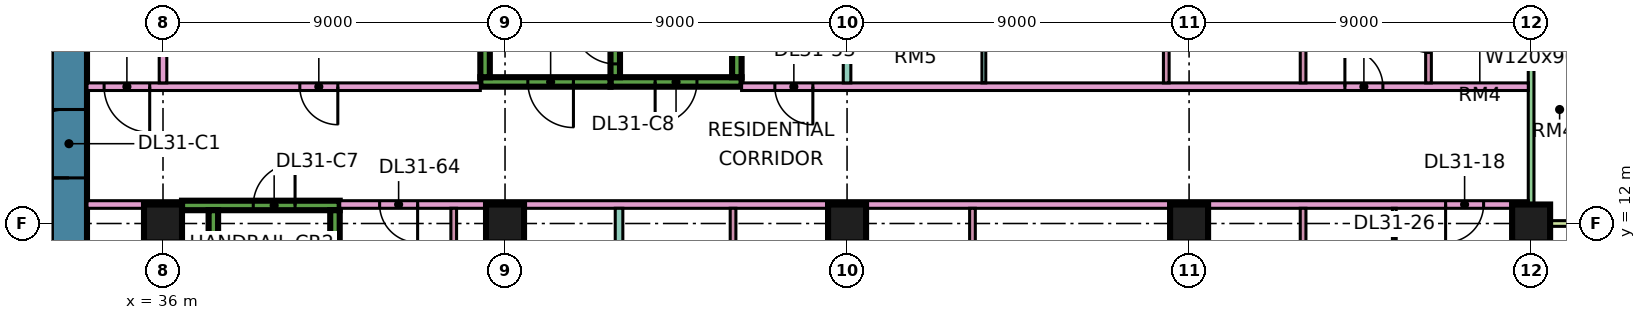
"""IFC4 building model, lengths in metres.
Left out: names, types, materials, properties, quantities, classifications, styles, units other than length and angle.
Written with IfcOpenShell. Run it as: python <this file> out.ifc"""

import sys

from ifc_helpers import new_model, si_unit, direction, frame, frame_2d, origin, origin_2d, place, context, subcontext, project, spatial, rectangle, extrude, element, fill, save


model = new_model("IFC4")
c1 = context("Model", 3, precision=1e-05, world=origin(), true_north=direction((0.0, 1.0)))
c2 = subcontext(c1, "Body", "Model", "MODEL_VIEW")
j1 = project(units=[si_unit("LENGTHUNIT", "METRE"), si_unit("PLANEANGLEUNIT", "RADIAN")], contexts=[c1])
p1 = place(None, origin())
s1 = spatial("IfcSite", under=j1, at=p1, CompositionType="ELEMENT")
p2 = place(p1, origin())
s2 = spatial("IfcBuilding", under=s1, at=p2, CompositionType="ELEMENT")
p3 = place(p2, frame((0.0, 0.0, 133.15)))
s3 = spatial("IfcBuildingStorey", under=s2, at=p3, CompositionType="ELEMENT", Elevation=133.15)
for number, where, z_axis, x_axis in (
    (1, (36.0, 12.0, 0.0), (0.0, 0.0, 1.0), (1.0, 0.0, 0.0)),
    (2, (45.0, 12.0, 0.0), (0.0, 0.0, 1.0), (1.0, 0.0, 0.0)),
    (3, (54.0, 12.0, 0.0), (0.0, 0.0, 1.0), (1.0, 0.0, 0.0)),
    (4, (63.0, 12.0, 0.0), (0.0, 0.0, 1.0), (1.0, 0.0, 0.0)),
    (5, (72.0, 12.0, 0.0), (0.0, 0.0, 1.0), (1.0, 0.0, 0.0)),
):
    element("IfcColumn", number, at=place(p3, frame(where, z_axis=z_axis, x_axis=x_axis)), inside=s3, PredefinedType="COLUMN", context=c2, shape_type="SweptSolid", body=[
        extrude(rectangle(XDim=1.0, YDim=1.0, at=origin_2d()), origin(), (0.0, 0.0, 1.0), 3.75),
    ])
p4 = place(p3, frame((33.525, 7.95, 0.0), z_axis=(0.0, 0.0, 1.0), x_axis=(0.0, 1.0, 0.0)))
e6 = element("IfcWall", 6, at=p4, inside=s3, PredefinedType="SHEAR", context=c2, shape_type="SweptSolid", body=[
    extrude(rectangle(XDim=11.1, YDim=0.95, at=frame_2d((5.55, 0.0))), origin(), (0.0, 0.0, 1.0), 3.75),
])
p5 = place(p4, frame((5.25, 0.0, 0.0)))
e7 = element("IfcOpeningElement", 7, at=p5, cuts=e6, PredefinedType="OPENING", context=c2, shape_type="SweptSolid", body=[
    extrude(rectangle(XDim=1.8, YDim=2.4, at=frame_2d((0.9, 1.2))), frame((0.0, 0.485, 0.0), z_axis=(0.0, -1.0, 0.0), x_axis=(1.0, 0.0, 0.0)), (0.0, 0.0, 1.0), 0.97),
])
p6 = place(p3, frame((36.5, 12.475, 0.0), z_axis=(0.0, 0.0, 1.0), x_axis=(1.0, 0.0, 0.0)))
e8 = element("IfcWall", 8, at=p6, inside=s3, PredefinedType="SHEAR", context=c2, shape_type="SweptSolid", body=[
    extrude(rectangle(XDim=4.15, YDim=0.25, at=frame_2d((2.075, 0.0))), origin(), (0.0, 0.0, 1.0), 3.75),
])
p7 = place(p6, frame((1.875, 0.0, 0.0)))
e9 = element("IfcOpeningElement", 9, at=p7, cuts=e8, PredefinedType="OPENING", context=c2, shape_type="SweptSolid", body=[
    extrude(rectangle(XDim=1.1, YDim=2.2, at=frame_2d((0.55, 1.1))), frame((0.0, 0.135, 0.0), z_axis=(0.0, -1.0, 0.0), x_axis=(1.0, 0.0, 0.0)), (0.0, 0.0, 1.0), 0.27),
])
for number, where, z_axis, x_axis in (
    (10, (37.325, 5.85, 0.0), (0.0, 0.0, 1.0), (0.0, 1.0, 0.0)),
    (11, (40.525, 5.85, 0.0), (0.0, 0.0, 1.0), (0.0, 1.0, 0.0)),
):
    element("IfcWall", number, at=place(p3, frame(where, z_axis=z_axis, x_axis=x_axis)), inside=s3, PredefinedType="SHEAR", context=c2, shape_type="SweptSolid", body=[
        extrude(rectangle(XDim=6.5, YDim=0.25, at=frame_2d((3.25, 0.0))), origin(), (0.0, 0.0, 1.0), 3.75),
    ])
p8 = place(p3, frame((47.775, 15.725, 0.0), z_axis=(0.0, 0.0, 1.0), x_axis=(1.0, 0.0, 0.0)))
e12 = element("IfcWall", 12, at=p8, inside=s3, PredefinedType="SHEAR", context=c2, shape_type="SweptSolid", body=[
    extrude(rectangle(XDim=3.45, YDim=0.25, at=frame_2d((1.725, 0.0))), origin(), (0.0, 0.0, 1.0), 3.75),
])
p9 = place(p8, frame((1.175, 0.0, 0.0)))
e13 = element("IfcOpeningElement", 13, at=p9, cuts=e12, PredefinedType="OPENING", context=c2, shape_type="SweptSolid", body=[
    extrude(rectangle(XDim=1.1, YDim=2.2, at=frame_2d((0.55, 1.1))), frame((0.0, 0.135, 0.0), z_axis=(0.0, -1.0, 0.0), x_axis=(1.0, 0.0, 0.0)), (0.0, 0.0, 1.0), 0.27),
])
p10 = place(p3, frame((47.9, 15.85, 0.0), z_axis=(0.0, 0.0, 1.0), x_axis=(0.0, 1.0, 0.0)))
e14 = element("IfcWall", 14, at=p10, inside=s3, PredefinedType="SHEAR", context=c2, shape_type="SweptSolid", body=[
    extrude(rectangle(XDim=6.5, YDim=0.25, at=frame_2d((3.25, 0.0))), origin(), (0.0, 0.0, 1.0), 3.75),
])
p11 = place(p10, frame((0.35, 0.0, 0.0)))
e15 = element("IfcOpeningElement", 15, at=p11, cuts=e14, PredefinedType="OPENING", context=c2, shape_type="SweptSolid", body=[
    extrude(rectangle(XDim=1.1, YDim=2.2, at=frame_2d((0.55, 1.1))), frame((0.0, 0.135, 0.0), z_axis=(0.0, -1.0, 0.0), x_axis=(1.0, 0.0, 0.0)), (0.0, 0.0, 1.0), 0.27),
])
p12 = place(p3, frame((51.1, 15.85, 0.0), z_axis=(0.0, 0.0, 1.0), x_axis=(0.0, 1.0, 0.0)))
e16 = element("IfcWall", 16, at=p12, inside=s3, PredefinedType="SHEAR", context=c2, shape_type="SweptSolid", body=[
    extrude(rectangle(XDim=6.5, YDim=0.25, at=frame_2d((3.25, 0.0))), origin(), (0.0, 0.0, 1.0), 3.75),
])
p13 = place(p3, frame((44.35, 15.725, 0.0), z_axis=(0.0, 0.0, 1.0), x_axis=(1.0, 0.0, 0.0)))
e17 = element("IfcWall", 17, at=p13, inside=s3, PredefinedType="SHEAR", context=c2, shape_type="SweptSolid", body=[
    extrude(rectangle(XDim=3.425, YDim=0.25, at=frame_2d((1.712, 0.0))), origin(), (0.0, 0.0, 1.0), 3.75),
])
p14 = place(p13, frame((1.25, 0.0, 0.0)))
e18 = element("IfcOpeningElement", 18, at=p14, cuts=e17, PredefinedType="OPENING", context=c2, shape_type="SweptSolid", body=[
    extrude(rectangle(XDim=1.2, YDim=2.2, at=frame_2d((0.6, 1.1))), frame((0.0, 0.135, 0.0), z_axis=(0.0, -1.0, 0.0), x_axis=(1.0, 0.0, 0.0)), (0.0, 0.0, 1.0), 0.27),
])
p15 = place(p3, frame((44.475, 15.85, 0.0), z_axis=(0.0, 0.0, 1.0), x_axis=(0.0, 1.0, 0.0)))
e19 = element("IfcWall", 19, at=p15, inside=s3, PredefinedType="SHEAR", context=c2, shape_type="SweptSolid", body=[
    extrude(rectangle(XDim=6.5, YDim=0.25, at=frame_2d((3.25, 0.0))), origin(), (0.0, 0.0, 1.0), 3.75),
])
p16 = place(p15, frame((1.75, 0.0, 0.0)))
e20 = element("IfcOpeningElement", 20, at=p16, cuts=e19, PredefinedType="OPENING", context=c2, shape_type="SweptSolid", body=[
    extrude(rectangle(XDim=1.1, YDim=2.2, at=frame_2d((0.55, 1.1))), frame((0.0, 0.135, 0.0), z_axis=(0.0, -1.0, 0.0), x_axis=(1.0, 0.0, 0.0)), (0.0, 0.0, 1.0), 0.27),
])
p17 = place(p15, frame((4.3, 0.0, 0.0)))
e21 = element("IfcOpeningElement", 21, at=p17, cuts=e19, PredefinedType="OPENING", context=c2, shape_type="SweptSolid", body=[
    extrude(rectangle(XDim=1.1, YDim=2.2, at=frame_2d((0.55, 1.1))), frame((0.0, 0.135, 0.0), z_axis=(0.0, -1.0, 0.0), x_axis=(1.0, 0.0, 0.0)), (0.0, 0.0, 1.0), 0.27),
])
p18 = place(p3, frame((72.0, 12.075, 0.0), z_axis=(0.0, 0.0, 1.0), x_axis=(0.0, 1.0, 0.0)))
e22 = element("IfcWall", 22, at=p18, inside=s3, PredefinedType="SOLIDWALL", context=c2, shape_type="SweptSolid", body=[
    extrude(rectangle(XDim=10.35, YDim=0.15, at=frame_2d((5.175, 0.0))), origin(), (0.0, 0.0, 1.0), 3.35),
])
p19 = place(p18, frame((4.275, 0.0, 1.7)))
e23 = element("IfcOpeningElement", 23, at=p19, cuts=e22, PredefinedType="OPENING", context=c2, shape_type="SweptSolid", body=[
    extrude(rectangle(XDim=1.2, YDim=0.9, at=frame_2d((0.6, 0.45))), frame((0.0, 0.085, 0.0), z_axis=(0.0, -1.0, 0.0), x_axis=(1.0, 0.0, 0.0)), (0.0, 0.0, 1.0), 0.17),
])
p20 = place(p18, frame((7.988, 0.0, 0.45)))
e24 = element("IfcOpeningElement", 24, at=p20, cuts=e22, PredefinedType="OPENING", context=c2, shape_type="SweptSolid", body=[
    extrude(rectangle(XDim=1.8, YDim=2.4, at=frame_2d((0.9, 1.2))), frame((0.0, 0.085, 0.0), z_axis=(0.0, -1.0, 0.0), x_axis=(1.0, 0.0, 0.0)), (0.0, 0.0, 1.0), 0.17),
])
p21 = place(p3, frame((73.5, 12.0, 0.0), z_axis=(0.0, 0.0, 1.0), x_axis=(-1.0, 0.0, 0.0)))
e25 = element("IfcWall", 25, at=p21, inside=s3, PredefinedType="SOLIDWALL", context=c2, shape_type="SweptSolid", body=[
    extrude(rectangle(XDim=1.5, YDim=0.15, at=frame_2d((0.75, 0.0))), origin(), (0.0, 0.0, 1.0), 3.35),
])
p22 = place(p3, frame((34.0, 12.5, 0.0), z_axis=(0.0, 0.0, 1.0), x_axis=(1.0, 0.0, 0.0)))
e26 = element("IfcWall", 26, at=p22, inside=s3, PredefinedType="PARTITIONING", context=c2, shape_type="SweptSolid", body=[
    extrude(rectangle(XDim=2.501, YDim=0.2, at=frame_2d((1.25, 0.0))), origin(), (0.0, 0.0, 1.0), 3.35),
])
p23 = place(p3, frame((34.0, 15.6, 0.0), z_axis=(0.0, 0.0, 1.0), x_axis=(1.0, 0.0, 0.0)))
e27 = element("IfcWall", 27, at=p23, inside=s3, PredefinedType="PARTITIONING", context=c2, shape_type="SweptSolid", body=[
    extrude(rectangle(XDim=10.35, YDim=0.2, at=frame_2d((5.175, 0.0))), origin(), (0.0, 0.0, 1.0), 3.35),
])
p24 = place(p23, frame((5.6, 0.0, 0.0)))
e28 = element("IfcOpeningElement", 28, at=p24, cuts=e27, PredefinedType="OPENING", context=c2, shape_type="SweptSolid", body=[
    extrude(rectangle(XDim=1.0, YDim=2.1, at=frame_2d((0.5, 1.05))), frame((0.0, 0.11, 0.0), z_axis=(0.0, -1.0, 0.0), x_axis=(1.0, 0.0, 0.0)), (0.0, 0.0, 1.0), 0.22),
])
p25 = place(p23, frame((0.45, 0.0, 0.0)))
e29 = element("IfcOpeningElement", 29, at=p25, cuts=e27, PredefinedType="OPENING", context=c2, shape_type="SweptSolid", body=[
    extrude(rectangle(XDim=1.2, YDim=2.1, at=frame_2d((0.6, 1.05))), frame((0.0, 0.11, 0.0), z_axis=(0.0, -1.0, 0.0), x_axis=(1.0, 0.0, 0.0)), (0.0, 0.0, 1.0), 0.22),
])
p26 = place(p3, frame((36.0, 15.7, 0.0), z_axis=(0.0, 0.0, 1.0), x_axis=(0.0, 1.0, 0.0)))
e30 = element("IfcWall", 30, at=p26, inside=s3, PredefinedType="PARTITIONING", context=c2, shape_type="SweptSolid", body=[
    extrude(rectangle(XDim=8.3, YDim=0.2, at=frame_2d((4.15, 0.0))), origin(), (0.0, 0.0, 1.0), 3.35),
])
p27 = place(p3, frame((40.65, 12.5, 0.0), z_axis=(0.0, 0.0, 1.0), x_axis=(1.0, 0.0, 0.0)))
e31 = element("IfcWall", 31, at=p27, inside=s3, PredefinedType="PARTITIONING", context=c2, shape_type="SweptSolid", body=[
    extrude(rectangle(XDim=31.276, YDim=0.2, at=frame_2d((15.638, 0.0))), origin(), (0.0, 0.0, 1.0), 3.35),
])
p28 = place(p27, frame((29.1, 0.0, 0.0)))
e32 = element("IfcOpeningElement", 32, at=p28, cuts=e31, PredefinedType="OPENING", context=c2, shape_type="SweptSolid", body=[
    extrude(rectangle(XDim=1.0, YDim=2.1, at=frame_2d((0.5, 1.05))), frame((0.0, 0.11, 0.0), z_axis=(0.0, -1.0, 0.0), x_axis=(1.0, 0.0, 0.0)), (0.0, 0.0, 1.0), 0.22),
])
p29 = place(p27, frame((1.05, 0.0, 0.0)))
e33 = element("IfcOpeningElement", 33, at=p29, cuts=e31, PredefinedType="OPENING", context=c2, shape_type="SweptSolid", body=[
    extrude(rectangle(XDim=1.0, YDim=2.1, at=frame_2d((0.5, 1.05))), frame((0.0, 0.11, 0.0), z_axis=(0.0, -1.0, 0.0), x_axis=(1.0, 0.0, 0.0)), (0.0, 0.0, 1.0), 0.22),
])
p30 = place(p3, frame((43.65, 5.825, 0.0), z_axis=(0.0, 0.0, 1.0), x_axis=(0.0, 1.0, 0.0)))
e34 = element("IfcWall", 34, at=p30, inside=s3, PredefinedType="PARTITIONING", context=c2, shape_type="SweptSolid", body=[
    extrude(rectangle(XDim=6.575, YDim=0.15, at=frame_2d((3.288, 0.0))), origin(), (0.0, 0.0, 1.0), 3.35),
])
p31 = place(p30, frame((4.425, 0.0, 0.0)))
e35 = element("IfcOpeningElement", 35, at=p31, cuts=e34, PredefinedType="OPENING", context=c2, shape_type="SweptSolid", body=[
    extrude(rectangle(XDim=0.9, YDim=2.1, at=frame_2d((0.45, 1.05))), frame((0.0, 0.085, 0.0), z_axis=(0.0, -1.0, 0.0), x_axis=(1.0, 0.0, 0.0)), (0.0, 0.0, 1.0), 0.17),
])
p32 = place(p3, frame((48.0, 0.0, 0.0), z_axis=(0.0, 0.0, 1.0), x_axis=(0.0, 1.0, 0.0)))
e36 = element("IfcWall", 36, at=p32, inside=s3, PredefinedType="PARTITIONING", context=c2, shape_type="SweptSolid", body=[
    extrude(rectangle(XDim=12.4, YDim=0.2, at=frame_2d((6.2, 0.0))), origin(), (0.0, 0.0, 1.0), 3.35),
])
p33 = place(p3, frame((51.0, 7.175, 0.0), z_axis=(0.0, 0.0, 1.0), x_axis=(0.0, 1.0, 0.0)))
e37 = element("IfcWall", 37, at=p33, inside=s3, PredefinedType="PARTITIONING", context=c2, shape_type="SweptSolid", body=[
    extrude(rectangle(XDim=5.225, YDim=0.15, at=frame_2d((2.612, 0.0))), origin(), (0.0, 0.0, 1.0), 3.35),
])
p34 = place(p3, frame((51.225, 15.6, 0.0), z_axis=(0.0, 0.0, 1.0), x_axis=(1.0, 0.0, 0.0)))
e38 = element("IfcWall", 38, at=p34, inside=s3, PredefinedType="PARTITIONING", context=c2, shape_type="SweptSolid", body=[
    extrude(rectangle(XDim=20.701, YDim=0.2, at=frame_2d((10.351, 0.0))), origin(), (0.0, 0.0, 1.0), 3.35),
])
p35 = place(p34, frame((15.875, 0.0, 0.0)))
e39 = element("IfcOpeningElement", 39, at=p35, cuts=e38, PredefinedType="OPENING", context=c2, shape_type="SweptSolid", body=[
    extrude(rectangle(XDim=1.0, YDim=2.1, at=frame_2d((0.5, 1.05))), frame((0.0, 0.11, 0.0), z_axis=(0.0, -1.0, 0.0), x_axis=(1.0, 0.0, 0.0)), (0.0, 0.0, 1.0), 0.22),
])
p36 = place(p34, frame((0.875, 0.0, 0.0)))
e40 = element("IfcOpeningElement", 40, at=p36, cuts=e38, PredefinedType="OPENING", context=c2, shape_type="SweptSolid", body=[
    extrude(rectangle(XDim=1.0, YDim=2.1, at=frame_2d((0.5, 1.05))), frame((0.0, 0.11, 0.0), z_axis=(0.0, -1.0, 0.0), x_axis=(1.0, 0.0, 0.0)), (0.0, 0.0, 1.0), 0.22),
])
p37 = place(p3, frame((53.7, 7.175, 0.0), z_axis=(0.0, 0.0, 1.0), x_axis=(0.0, 1.0, 0.0)))
e41 = element("IfcWall", 41, at=p37, inside=s3, PredefinedType="PARTITIONING", context=c2, shape_type="SweptSolid", body=[
    extrude(rectangle(XDim=5.225, YDim=0.15, at=frame_2d((2.612, 0.0))), origin(), (0.0, 0.0, 1.0), 3.35),
])
p38 = place(p3, frame((54.0, 15.7, 0.0), z_axis=(0.0, 0.0, 1.0), x_axis=(0.0, 1.0, 0.0)))
e42 = element("IfcWall", 42, at=p38, inside=s3, PredefinedType="PARTITIONING", context=c2, shape_type="SweptSolid", body=[
    extrude(rectangle(XDim=8.3, YDim=0.2, at=frame_2d((4.15, 0.0))), origin(), (0.0, 0.0, 1.0), 3.35),
])
p39 = place(p3, frame((57.3, 7.175, 0.0), z_axis=(0.0, 0.0, 1.0), x_axis=(0.0, 1.0, 0.0)))
e43 = element("IfcWall", 43, at=p39, inside=s3, PredefinedType="PARTITIONING", context=c2, shape_type="SweptSolid", body=[
    extrude(rectangle(XDim=5.225, YDim=0.15, at=frame_2d((2.612, 0.0))), origin(), (0.0, 0.0, 1.0), 3.35),
])
p40 = place(p3, frame((57.6, 15.7, 0.0), z_axis=(0.0, 0.0, 1.0), x_axis=(0.0, 1.0, 0.0)))
e44 = element("IfcWall", 44, at=p40, inside=s3, PredefinedType="PARTITIONING", context=c2, shape_type="SweptSolid", body=[
    extrude(rectangle(XDim=2.525, YDim=0.1, at=frame_2d((1.263, 0.0))), origin(), (0.0, 0.0, 1.0), 3.35),
])
p41 = place(p3, frame((62.4, 15.7, 0.0), z_axis=(0.0, 0.0, 1.0), x_axis=(0.0, 1.0, 0.0)))
e45 = element("IfcWall", 45, at=p41, inside=s3, PredefinedType="PARTITIONING", context=c2, shape_type="SweptSolid", body=[
    extrude(rectangle(XDim=2.525, YDim=0.15, at=frame_2d((1.263, 0.0))), origin(), (0.0, 0.0, 1.0), 3.35),
])
for number, where, z_axis, x_axis in (
    (46, (63.0, 7.175, 0.0), (0.0, 0.0, 1.0), (0.0, 1.0, 0.0)),
    (47, (66.0, 7.175, 0.0), (0.0, 0.0, 1.0), (0.0, 1.0, 0.0)),
):
    element("IfcWall", number, at=place(p3, frame(where, z_axis=z_axis, x_axis=x_axis)), inside=s3, PredefinedType="PARTITIONING", context=c2, shape_type="SweptSolid", body=[
        extrude(rectangle(XDim=5.225, YDim=0.15, at=frame_2d((2.612, 0.0))), origin(), (0.0, 0.0, 1.0), 3.35),
    ])
p42 = place(p3, frame((66.0, 15.7, 0.0), z_axis=(0.0, 0.0, 1.0), x_axis=(0.0, 1.0, 0.0)))
e48 = element("IfcWall", 48, at=p42, inside=s3, PredefinedType="PARTITIONING", context=c2, shape_type="SweptSolid", body=[
    extrude(rectangle(XDim=2.525, YDim=0.15, at=frame_2d((1.263, 0.0))), origin(), (0.0, 0.0, 1.0), 3.35),
])
p43 = place(p42, frame((0.9, 0.0, 0.0)))
e49 = element("IfcOpeningElement", 49, at=p43, cuts=e48, PredefinedType="OPENING", context=c2, shape_type="SweptSolid", body=[
    extrude(rectangle(XDim=0.8, YDim=2.1, at=frame_2d((0.4, 1.05))), frame((0.0, 0.085, 0.0), z_axis=(0.0, -1.0, 0.0), x_axis=(1.0, 0.0, 0.0)), (0.0, 0.0, 1.0), 0.17),
])
p44 = place(p3, frame((68.4, 7.175, 0.0), z_axis=(0.0, 0.0, 1.0), x_axis=(0.0, 1.0, 0.0)))
e50 = element("IfcWall", 50, at=p44, inside=s3, PredefinedType="PARTITIONING", context=c2, shape_type="SweptSolid", body=[
    extrude(rectangle(XDim=5.225, YDim=0.1, at=frame_2d((2.612, 0.0))), origin(), (0.0, 0.0, 1.0), 3.35),
])
p45 = place(p44, frame((2.175, 0.0, 0.0)))
e51 = element("IfcOpeningElement", 51, at=p45, cuts=e50, PredefinedType="OPENING", context=c2, shape_type="SweptSolid", body=[
    extrude(rectangle(XDim=0.9, YDim=2.1, at=frame_2d((0.45, 1.05))), frame((0.0, 0.06, 0.0), z_axis=(0.0, -1.0, 0.0), x_axis=(1.0, 0.0, 0.0)), (0.0, 0.0, 1.0), 0.12),
])
p46 = place(p3, frame((69.3, 15.7, 0.0), z_axis=(0.0, 0.0, 1.0), x_axis=(0.0, 1.0, 0.0)))
e52 = element("IfcWall", 52, at=p46, inside=s3, PredefinedType="PARTITIONING", context=c2, shape_type="SweptSolid", body=[
    extrude(rectangle(XDim=2.675, YDim=0.15, at=frame_2d((1.337, 0.0))), origin(), (0.0, 0.0, 1.0), 3.35),
])
p47 = place(p46, frame((0.8, 0.0, 0.0)))
e53 = element("IfcOpeningElement", 53, at=p47, cuts=e52, PredefinedType="OPENING", context=c2, shape_type="SweptSolid", body=[
    extrude(rectangle(XDim=0.8, YDim=2.1, at=frame_2d((0.4, 1.05))), frame((0.0, 0.085, 0.0), z_axis=(0.0, -1.0, 0.0), x_axis=(1.0, 0.0, 0.0)), (0.0, 0.0, 1.0), 0.17),
])
p48 = place(p19, origin())
e54 = element("IfcWindow", 54, at=p48, inside=s3, PartitioningType="SINGLE_PANEL", PredefinedType="WINDOW", context=c2, shape_type="SweptSolid", body=[
    extrude(rectangle(XDim=1.2, YDim=0.9, at=frame_2d((0.6, 0.45))), frame((0.0, 0.03, 0.0), z_axis=(0.0, -1.0, 0.0), x_axis=(1.0, 0.0, 0.0)), (0.0, 0.0, 1.0), 0.06),
])
fill(e23, e54)
p49 = place(p5, origin())
e55 = element("IfcDoor", 55, at=p49, inside=s3, OperationType="DOUBLE_DOOR_SINGLE_SWING", PredefinedType="DOOR", context=c2, shape_type="SweptSolid", body=[
    extrude(rectangle(XDim=1.8, YDim=2.4, at=frame_2d((0.9, 1.2))), frame((0.0, 0.025, 0.0), z_axis=(0.0, -1.0, 0.0), x_axis=(1.0, 0.0, 0.0)), (0.0, 0.0, 1.0), 0.05),
])
fill(e7, e55)
p50 = place(p7, frame((1.1, 0.0, 0.0), z_axis=(0.0, 0.0, 1.0), x_axis=(-1.0, 0.0, 0.0)))
e56 = element("IfcDoor", 56, at=p50, inside=s3, OperationType="SINGLE_SWING_RIGHT", PredefinedType="DOOR", context=c2, shape_type="SweptSolid", body=[
    extrude(rectangle(XDim=1.1, YDim=2.2, at=frame_2d((0.55, 1.1))), frame((0.0, 0.025, 0.0), z_axis=(0.0, -1.0, 0.0), x_axis=(1.0, 0.0, 0.0)), (0.0, 0.0, 1.0), 0.05),
])
fill(e9, e56)
p51 = place(p9, frame((1.1, 0.0, 0.0), z_axis=(0.0, 0.0, 1.0), x_axis=(-1.0, 0.0, 0.0)))
e57 = element("IfcDoor", 57, at=p51, inside=s3, OperationType="SINGLE_SWING_LEFT", PredefinedType="DOOR", context=c2, shape_type="SweptSolid", body=[
    extrude(rectangle(XDim=1.1, YDim=2.2, at=frame_2d((0.55, 1.1))), frame((0.0, 0.025, 0.0), z_axis=(0.0, -1.0, 0.0), x_axis=(1.0, 0.0, 0.0)), (0.0, 0.0, 1.0), 0.05),
])
fill(e13, e57)
p52 = place(p14, origin())
e58 = element("IfcDoor", 58, at=p52, inside=s3, OperationType="SINGLE_SWING_RIGHT", PredefinedType="DOOR", context=c2, shape_type="SweptSolid", body=[
    extrude(rectangle(XDim=1.2, YDim=2.2, at=frame_2d((0.6, 1.1))), frame((0.0, 0.025, 0.0), z_axis=(0.0, -1.0, 0.0), x_axis=(1.0, 0.0, 0.0)), (0.0, 0.0, 1.0), 0.05),
])
fill(e18, e58)
p53 = place(p11, frame((1.1, 0.0, 0.0), z_axis=(0.0, 0.0, 1.0), x_axis=(-1.0, 0.0, 0.0)))
e59 = element("IfcDoor", 59, at=p53, inside=s3, OperationType="SINGLE_SWING_RIGHT", PredefinedType="DOOR", context=c2, shape_type="SweptSolid", body=[
    extrude(rectangle(XDim=1.1, YDim=2.2, at=frame_2d((0.55, 1.1))), frame((0.0, 0.025, 0.0), z_axis=(0.0, -1.0, 0.0), x_axis=(1.0, 0.0, 0.0)), (0.0, 0.0, 1.0), 0.05),
])
fill(e15, e59)
p54 = place(p24, origin())
e60 = element("IfcDoor", 60, at=p54, inside=s3, OperationType="SINGLE_SWING_RIGHT", PredefinedType="DOOR", context=c2, shape_type="SweptSolid", body=[
    extrude(rectangle(XDim=1.0, YDim=2.1, at=frame_2d((0.5, 1.05))), frame((0.0, 0.025, 0.0), z_axis=(0.0, -1.0, 0.0), x_axis=(1.0, 0.0, 0.0)), (0.0, 0.0, 1.0), 0.05),
])
fill(e28, e60)
p55 = place(p47, frame((0.8, 0.0, 0.0), z_axis=(0.0, 0.0, 1.0), x_axis=(-1.0, 0.0, 0.0)))
e61 = element("IfcDoor", 61, at=p55, inside=s3, OperationType="SINGLE_SWING_RIGHT", PredefinedType="DOOR", context=c2, shape_type="SweptSolid", body=[
    extrude(rectangle(XDim=0.8, YDim=2.1, at=frame_2d((0.4, 1.05))), frame((0.0, 0.025, 0.0), z_axis=(0.0, -1.0, 0.0), x_axis=(1.0, 0.0, 0.0)), (0.0, 0.0, 1.0), 0.05),
])
fill(e53, e61)
p56 = place(p35, origin())
e62 = element("IfcDoor", 62, at=p56, inside=s3, OperationType="SINGLE_SWING_LEFT", PredefinedType="DOOR", context=c2, shape_type="SweptSolid", body=[
    extrude(rectangle(XDim=1.0, YDim=2.1, at=frame_2d((0.5, 1.05))), frame((0.0, 0.025, 0.0), z_axis=(0.0, -1.0, 0.0), x_axis=(1.0, 0.0, 0.0)), (0.0, 0.0, 1.0), 0.05),
])
fill(e39, e62)
p57 = place(p28, frame((1.0, 0.0, 0.0), z_axis=(0.0, 0.0, 1.0), x_axis=(-1.0, 0.0, 0.0)))
e63 = element("IfcDoor", 63, at=p57, inside=s3, OperationType="SINGLE_SWING_LEFT", PredefinedType="DOOR", context=c2, shape_type="SweptSolid", body=[
    extrude(rectangle(XDim=1.0, YDim=2.1, at=frame_2d((0.5, 1.05))), frame((0.0, 0.025, 0.0), z_axis=(0.0, -1.0, 0.0), x_axis=(1.0, 0.0, 0.0)), (0.0, 0.0, 1.0), 0.05),
])
fill(e32, e63)
p58 = place(p25, origin())
e64 = element("IfcDoor", 64, at=p58, inside=s3, OperationType="SINGLE_SWING_RIGHT", PredefinedType="DOOR", context=c2, shape_type="SweptSolid", body=[
    extrude(rectangle(XDim=1.2, YDim=2.1, at=frame_2d((0.6, 1.05))), frame((0.0, 0.025, 0.0), z_axis=(0.0, -1.0, 0.0), x_axis=(1.0, 0.0, 0.0)), (0.0, 0.0, 1.0), 0.05),
])
fill(e29, e64)
p59 = place(p36, origin())
e65 = element("IfcDoor", 65, at=p59, inside=s3, OperationType="SINGLE_SWING_RIGHT", PredefinedType="DOOR", context=c2, shape_type="SweptSolid", body=[
    extrude(rectangle(XDim=1.0, YDim=2.1, at=frame_2d((0.5, 1.05))), frame((0.0, 0.025, 0.0), z_axis=(0.0, -1.0, 0.0), x_axis=(1.0, 0.0, 0.0)), (0.0, 0.0, 1.0), 0.05),
])
fill(e40, e65)
p60 = place(p29, origin())
e66 = element("IfcDoor", 66, at=p60, inside=s3, OperationType="SINGLE_SWING_RIGHT", PredefinedType="DOOR", context=c2, shape_type="SweptSolid", body=[
    extrude(rectangle(XDim=1.0, YDim=2.1, at=frame_2d((0.5, 1.05))), frame((0.0, 0.025, 0.0), z_axis=(0.0, -1.0, 0.0), x_axis=(1.0, 0.0, 0.0)), (0.0, 0.0, 1.0), 0.05),
])
fill(e33, e66)
save(model, sys.argv[1])
